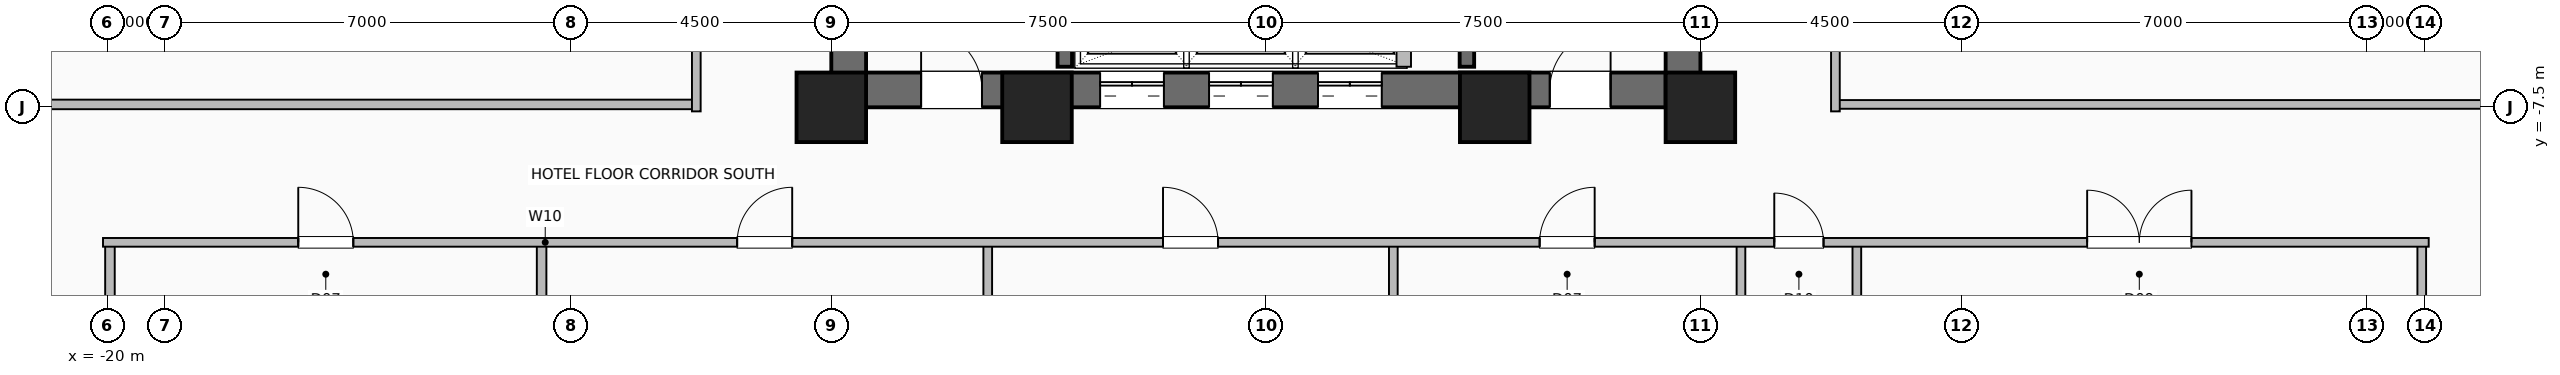
"""IFC4 building model, lengths in metres.
Left out: names, types, materials, properties, quantities, classifications, styles, units other than length and angle.
Written with IfcOpenShell. Run it as: python <this file> out.ifc"""

import sys

from ifc_helpers import new_model, si_unit, direction, frame, frame_2d, origin, origin_2d, place, context, subcontext, project, spatial, rectangle, hollow_rectangle, extrude, element, fill, save


model = new_model("IFC4")
c1 = context("Model", 3, precision=1e-05, world=origin(), true_north=direction((0.0, 1.0)))
c2 = subcontext(c1, "Body", "Model", "MODEL_VIEW")
j1 = project(units=[si_unit("LENGTHUNIT", "METRE"), si_unit("PLANEANGLEUNIT", "RADIAN")], contexts=[c1])
p1 = place(None, origin())
s1 = spatial("IfcSite", under=j1, at=p1, CompositionType="ELEMENT")
p2 = place(p1, origin())
s2 = spatial("IfcBuilding", under=s1, at=p2, CompositionType="ELEMENT")
p3 = place(p2, frame((0.0, 0.0, 41.0)))
s3 = spatial("IfcBuildingStorey", under=s2, at=p3, CompositionType="ELEMENT", Elevation=41.0)
for number, where, z_axis, x_axis in (
    (1, (-7.5, -7.5, 0.0), (0.0, 0.0, 1.0), (1.0, 0.0, 0.0)),
    (2, (-3.95, -7.5, 0.0), (0.0, 0.0, 1.0), (1.0, 0.0, 0.0)),
    (3, (3.95, -7.5, 0.0), (0.0, 0.0, 1.0), (1.0, 0.0, 0.0)),
    (4, (7.5, -7.5, 0.0), (0.0, 0.0, 1.0), (1.0, 0.0, 0.0)),
):
    element("IfcColumn", number, at=place(p3, frame(where, z_axis=z_axis, x_axis=x_axis)), inside=s3, PredefinedType="COLUMN", context=c2, shape_type="SweptSolid", body=[
        extrude(hollow_rectangle(XDim=1.2, YDim=1.2, WallThickness=0.055, at=origin_2d()), origin(), (0.0, 0.0, 1.0), 3.5),
    ])
p4 = place(p3, frame((-7.5, -7.2, 0.0), z_axis=(0.0, 0.0, 1.0), x_axis=(1.0, 0.0, 0.0)))
e5 = element("IfcWall", 5, at=p4, inside=s3, PredefinedType="SHEAR", context=c2, shape_type="SweptSolid", body=[
    extrude(rectangle(XDim=15.0, YDim=0.6, at=frame_2d((7.5, 0.0))), origin(), (0.0, 0.0, 1.0), 3.25),
])
p5 = place(p4, frame((1.55, 0.0, 0.0)))
e6 = element("IfcOpeningElement", 6, at=p5, cuts=e5, PredefinedType="OPENING", context=c2, shape_type="SweptSolid", body=[
    extrude(rectangle(XDim=1.05, YDim=2.08, at=frame_2d((0.525, 1.04))), frame((0.0, 0.31, 0.0), z_axis=(0.0, -1.0, 0.0), x_axis=(1.0, 0.0, 0.0)), (0.0, 0.0, 1.0), 0.62),
])
p6 = place(p4, frame((12.4, 0.0, 0.0)))
e7 = element("IfcOpeningElement", 7, at=p6, cuts=e5, PredefinedType="OPENING", context=c2, shape_type="SweptSolid", body=[
    extrude(rectangle(XDim=1.05, YDim=2.08, at=frame_2d((0.525, 1.04))), frame((0.0, 0.31, 0.0), z_axis=(0.0, -1.0, 0.0), x_axis=(1.0, 0.0, 0.0)), (0.0, 0.0, 1.0), 0.62),
])
p7 = place(p4, frame((4.64, 0.0, 0.0)))
e8 = element("IfcOpeningElement", 8, at=p7, cuts=e5, PredefinedType="OPENING", context=c2, shape_type="SweptSolid", body=[
    extrude(rectangle(XDim=1.1, YDim=2.2, at=frame_2d((0.55, 1.1))), frame((0.0, 0.31, 0.0), z_axis=(0.0, -1.0, 0.0), x_axis=(1.0, 0.0, 0.0)), (0.0, 0.0, 1.0), 0.62),
])
p8 = place(p4, frame((6.52, 0.0, 0.0)))
e9 = element("IfcOpeningElement", 9, at=p8, cuts=e5, PredefinedType="OPENING", context=c2, shape_type="SweptSolid", body=[
    extrude(rectangle(XDim=1.1, YDim=2.2, at=frame_2d((0.55, 1.1))), frame((0.0, 0.31, 0.0), z_axis=(0.0, -1.0, 0.0), x_axis=(1.0, 0.0, 0.0)), (0.0, 0.0, 1.0), 0.62),
])
p9 = place(p4, frame((8.4, 0.0, 0.0)))
e10 = element("IfcOpeningElement", 10, at=p9, cuts=e5, PredefinedType="OPENING", context=c2, shape_type="SweptSolid", body=[
    extrude(rectangle(XDim=1.1, YDim=2.2, at=frame_2d((0.55, 1.1))), frame((0.0, 0.31, 0.0), z_axis=(0.0, -1.0, 0.0), x_axis=(1.0, 0.0, 0.0)), (0.0, 0.0, 1.0), 0.62),
])
p10 = place(p3, frame((-7.2, -7.5, 0.0), z_axis=(0.0, 0.0, 1.0), x_axis=(0.0, 1.0, 0.0)))
e11 = element("IfcWall", 11, at=p10, inside=s3, PredefinedType="SHEAR", context=c2, shape_type="SweptSolid", body=[
    extrude(rectangle(XDim=15.0, YDim=0.6, at=frame_2d((7.5, 0.0))), origin(), (0.0, 0.0, 1.0), 3.25),
])
p11 = place(p10, frame((9.5, 0.0, 0.0)))
e12 = element("IfcOpeningElement", 12, at=p11, cuts=e11, PredefinedType="OPENING", context=c2, shape_type="SweptSolid", body=[
    extrude(rectangle(XDim=1.0, YDim=2.08, at=frame_2d((0.5, 1.04))), frame((0.0, 0.31, 0.0), z_axis=(0.0, -1.0, 0.0), x_axis=(1.0, 0.0, 0.0)), (0.0, 0.0, 1.0), 0.62),
])
p12 = place(p3, frame((7.2, -7.5, 0.0), z_axis=(0.0, 0.0, 1.0), x_axis=(0.0, 1.0, 0.0)))
e13 = element("IfcWall", 13, at=p12, inside=s3, PredefinedType="SHEAR", context=c2, shape_type="SweptSolid", body=[
    extrude(rectangle(XDim=15.0, YDim=0.6, at=frame_2d((7.5, 0.0))), origin(), (0.0, 0.0, 1.0), 3.25),
])
for number, where, z_axis, x_axis in (
    (14, (-3.47, -6.8, 0.0), (0.0, 0.0, 1.0), (0.0, 1.0, 0.0)),
    (15, (3.47, -6.8, 0.0), (0.0, 0.0, 1.0), (0.0, 1.0, 0.0)),
):
    element("IfcWall", number, at=place(p3, frame(where, z_axis=z_axis, x_axis=x_axis)), inside=s3, PredefinedType="SHEAR", context=c2, shape_type="SweptSolid", body=[
        extrude(rectangle(XDim=7.72, YDim=0.25, at=frame_2d((3.86, 0.0))), origin(), (0.0, 0.0, 1.0), 3.25),
    ])
p13 = place(p3, frame((2.38, -6.8, 0.0), z_axis=(0.0, 0.0, 1.0), x_axis=(0.0, 1.0, 0.0)))
e16 = element("IfcWall", 16, at=p13, inside=s3, PredefinedType="SHEAR", context=c2, shape_type="SweptSolid", body=[
    extrude(rectangle(XDim=2.22, YDim=0.25, at=frame_2d((1.11, 0.0))), origin(), (0.0, 0.0, 1.0), 3.25),
])
for number, where, z_axis, x_axis in (
    (17, (-19.95, -23.82, 0.0), (0.0, 0.0, 1.0), (0.0, 1.0, 0.0)),
    (18, (-12.5, -23.82, 0.0), (0.0, 0.0, 1.0), (0.0, 1.0, 0.0)),
):
    element("IfcWall", number, at=place(p3, frame(where, z_axis=z_axis, x_axis=x_axis)), inside=s3, PredefinedType="PLUMBINGWALL", context=c2, shape_type="SweptSolid", body=[
        extrude(rectangle(XDim=13.99, YDim=0.165, at=frame_2d((6.995, 0.0))), origin(), (0.0, 0.0, 1.0), 3.25),
    ])
p14 = place(p3, frame((-4.8, -23.82, 0.0), z_axis=(0.0, 0.0, 1.0), x_axis=(0.0, 1.0, 0.0)))
e19 = element("IfcWall", 19, at=p14, inside=s3, PredefinedType="PARTITIONING", context=c2, shape_type="SweptSolid", body=[
    extrude(rectangle(XDim=13.99, YDim=0.15, at=frame_2d((6.995, 0.0))), origin(), (0.0, 0.0, 1.0), 2.818),
])
for number, where, z_axis, x_axis in (
    (20, (2.2, -23.82, 0.0), (0.0, 0.0, 1.0), (0.0, 1.0, 0.0)),
    (21, (8.2, -23.82, 0.0), (0.0, 0.0, 1.0), (0.0, 1.0, 0.0)),
    (22, (10.2, -23.82, 0.0), (0.0, 0.0, 1.0), (0.0, 1.0, 0.0)),
    (23, (19.95, -23.82, 0.0), (0.0, 0.0, 1.0), (0.0, 1.0, 0.0)),
):
    element("IfcWall", number, at=place(p3, frame(where, z_axis=z_axis, x_axis=x_axis)), inside=s3, PredefinedType="PARTITIONING", context=c2, shape_type="SweptSolid", body=[
        extrude(rectangle(XDim=13.99, YDim=0.15, at=frame_2d((6.995, 0.0))), origin(), (0.0, 0.0, 1.0), 3.25),
    ])
p15 = place(p3, frame((-20.07, -9.83, 0.0), z_axis=(0.0, 0.0, 1.0), x_axis=(1.0, 0.0, 0.0)))
e24 = element("IfcWall", 24, at=p15, inside=s3, PredefinedType="PARTITIONING", context=c2, shape_type="SweptSolid", body=[
    extrude(rectangle(XDim=40.14, YDim=0.15, at=frame_2d((20.07, 0.0))), origin(), (0.0, 0.0, 1.0), 3.25),
])
p16 = place(p15, frame((3.37, 0.0, 0.0)))
e25 = element("IfcOpeningElement", 25, at=p16, cuts=e24, PredefinedType="OPENING", context=c2, shape_type="SweptSolid", body=[
    extrude(rectangle(XDim=0.95, YDim=2.06, at=frame_2d((0.475, 1.03))), frame((0.0, 0.085, 0.0), z_axis=(0.0, -1.0, 0.0), x_axis=(1.0, 0.0, 0.0)), (0.0, 0.0, 1.0), 0.17),
])
p17 = place(p15, frame((10.945, 0.0, 0.0)))
e26 = element("IfcOpeningElement", 26, at=p17, cuts=e24, PredefinedType="OPENING", context=c2, shape_type="SweptSolid", body=[
    extrude(rectangle(XDim=0.95, YDim=2.06, at=frame_2d((0.475, 1.03))), frame((0.0, 0.085, 0.0), z_axis=(0.0, -1.0, 0.0), x_axis=(1.0, 0.0, 0.0)), (0.0, 0.0, 1.0), 0.17),
])
p18 = place(p15, frame((18.295, 0.0, 0.0)))
e27 = element("IfcOpeningElement", 27, at=p18, cuts=e24, PredefinedType="OPENING", context=c2, shape_type="SweptSolid", body=[
    extrude(rectangle(XDim=0.95, YDim=2.06, at=frame_2d((0.475, 1.03))), frame((0.0, 0.085, 0.0), z_axis=(0.0, -1.0, 0.0), x_axis=(1.0, 0.0, 0.0)), (0.0, 0.0, 1.0), 0.17),
])
p19 = place(p15, frame((24.795, 0.0, 0.0)))
e28 = element("IfcOpeningElement", 28, at=p19, cuts=e24, PredefinedType="OPENING", context=c2, shape_type="SweptSolid", body=[
    extrude(rectangle(XDim=0.95, YDim=2.06, at=frame_2d((0.475, 1.03))), frame((0.0, 0.085, 0.0), z_axis=(0.0, -1.0, 0.0), x_axis=(1.0, 0.0, 0.0)), (0.0, 0.0, 1.0), 0.17),
])
p20 = place(p15, frame((28.845, 0.0, 0.0)))
e29 = element("IfcOpeningElement", 29, at=p20, cuts=e24, PredefinedType="OPENING", context=c2, shape_type="SweptSolid", body=[
    extrude(rectangle(XDim=0.85, YDim=2.05, at=frame_2d((0.425, 1.025))), frame((0.0, 0.085, 0.0), z_axis=(0.0, -1.0, 0.0), x_axis=(1.0, 0.0, 0.0)), (0.0, 0.0, 1.0), 0.17),
])
p21 = place(p15, frame((34.245, 0.0, 0.0)))
e30 = element("IfcOpeningElement", 30, at=p21, cuts=e24, PredefinedType="OPENING", context=c2, shape_type="SweptSolid", body=[
    extrude(rectangle(XDim=1.8, YDim=2.08, at=frame_2d((0.9, 1.04))), frame((0.0, 0.085, 0.0), z_axis=(0.0, -1.0, 0.0), x_axis=(1.0, 0.0, 0.0)), (0.0, 0.0, 1.0), 0.17),
])
p22 = place(p3, frame((-23.82, -7.45, 0.0), z_axis=(0.0, 0.0, 1.0), x_axis=(1.0, 0.0, 0.0)))
e31 = element("IfcWall", 31, at=p22, inside=s3, PredefinedType="PLUMBINGWALL", context=c2, shape_type="SweptSolid", body=[
    extrude(rectangle(XDim=13.99, YDim=0.165, at=frame_2d((6.995, 0.0))), origin(), (0.0, 0.0, 1.0), 3.25),
])
p23 = place(p3, frame((-9.83, -7.57, 0.0), z_axis=(0.0, 0.0, 1.0), x_axis=(0.0, 1.0, 0.0)))
e32 = element("IfcWall", 32, at=p23, inside=s3, PredefinedType="PARTITIONING", context=c2, shape_type="SweptSolid", body=[
    extrude(rectangle(XDim=15.14, YDim=0.15, at=frame_2d((7.57, 0.0))), origin(), (0.0, 0.0, 1.0), 3.25),
])
p24 = place(p23, frame((4.845, 0.0, 0.0)))
e33 = element("IfcOpeningElement", 33, at=p24, cuts=e32, PredefinedType="OPENING", context=c2, shape_type="SweptSolid", body=[
    extrude(rectangle(XDim=1.8, YDim=2.08, at=frame_2d((0.9, 1.04))), frame((0.0, 0.085, 0.0), z_axis=(0.0, -1.0, 0.0), x_axis=(1.0, 0.0, 0.0)), (0.0, 0.0, 1.0), 0.17),
])
p25 = place(p23, frame((11.77, 0.0, 0.0)))
e34 = element("IfcOpeningElement", 34, at=p25, cuts=e32, PredefinedType="OPENING", context=c2, shape_type="SweptSolid", body=[
    extrude(rectangle(XDim=0.85, YDim=2.05, at=frame_2d((0.425, 1.025))), frame((0.0, 0.085, 0.0), z_axis=(0.0, -1.0, 0.0), x_axis=(1.0, 0.0, 0.0)), (0.0, 0.0, 1.0), 0.17),
])
p26 = place(p23, frame((13.545, 0.0, 0.0)))
e35 = element("IfcOpeningElement", 35, at=p26, cuts=e32, PredefinedType="OPENING", context=c2, shape_type="SweptSolid", body=[
    extrude(rectangle(XDim=0.95, YDim=2.06, at=frame_2d((0.475, 1.03))), frame((0.0, 0.085, 0.0), z_axis=(0.0, -1.0, 0.0), x_axis=(1.0, 0.0, 0.0)), (0.0, 0.0, 1.0), 0.17),
])
p27 = place(p3, frame((9.83, -7.45, 0.0), z_axis=(0.0, 0.0, 1.0), x_axis=(1.0, 0.0, 0.0)))
e36 = element("IfcWall", 36, at=p27, inside=s3, PredefinedType="PARTITIONING", context=c2, shape_type="SweptSolid", body=[
    extrude(rectangle(XDim=13.99, YDim=0.15, at=frame_2d((6.995, 0.0))), origin(), (0.0, 0.0, 1.0), 3.25),
])
p28 = place(p3, frame((9.83, -7.57, 0.0), z_axis=(0.0, 0.0, 1.0), x_axis=(0.0, 1.0, 0.0)))
e37 = element("IfcWall", 37, at=p28, inside=s3, PredefinedType="PARTITIONING", context=c2, shape_type="SweptSolid", body=[
    extrude(rectangle(XDim=15.14, YDim=0.15, at=frame_2d((7.57, 0.0))), origin(), (0.0, 0.0, 1.0), 3.25),
])
p29 = place(p28, frame((2.12, 0.0, 0.0)))
e38 = element("IfcOpeningElement", 38, at=p29, cuts=e37, PredefinedType="OPENING", context=c2, shape_type="SweptSolid", body=[
    extrude(rectangle(XDim=0.95, YDim=2.06, at=frame_2d((0.475, 1.03))), frame((0.0, 0.085, 0.0), z_axis=(0.0, -1.0, 0.0), x_axis=(1.0, 0.0, 0.0)), (0.0, 0.0, 1.0), 0.17),
])
p30 = place(p28, frame((7.095, 0.0, 0.0)))
e39 = element("IfcOpeningElement", 39, at=p30, cuts=e37, PredefinedType="OPENING", context=c2, shape_type="SweptSolid", body=[
    extrude(rectangle(XDim=0.95, YDim=2.06, at=frame_2d((0.475, 1.03))), frame((0.0, 0.085, 0.0), z_axis=(0.0, -1.0, 0.0), x_axis=(1.0, 0.0, 0.0)), (0.0, 0.0, 1.0), 0.17),
])
p31 = place(p28, frame((12.07, 0.0, 0.0)))
e40 = element("IfcOpeningElement", 40, at=p31, cuts=e37, PredefinedType="OPENING", context=c2, shape_type="SweptSolid", body=[
    extrude(rectangle(XDim=0.95, YDim=2.06, at=frame_2d((0.475, 1.03))), frame((0.0, 0.085, 0.0), z_axis=(0.0, -1.0, 0.0), x_axis=(1.0, 0.0, 0.0)), (0.0, 0.0, 1.0), 0.17),
])
p32 = place(p5, origin())
e41 = element("IfcDoor", 41, at=p32, inside=s3, OperationType="SINGLE_SWING_LEFT", PredefinedType="DOOR", context=c2, shape_type="SweptSolid", body=[
    extrude(rectangle(XDim=1.05, YDim=2.08, at=frame_2d((0.525, 1.04))), frame((0.0, 0.025, 0.0), z_axis=(0.0, -1.0, 0.0), x_axis=(1.0, 0.0, 0.0)), (0.0, 0.0, 1.0), 0.05),
])
fill(e6, e41)
p33 = place(p6, origin())
e42 = element("IfcDoor", 42, at=p33, inside=s3, OperationType="SINGLE_SWING_RIGHT", PredefinedType="DOOR", context=c2, shape_type="SweptSolid", body=[
    extrude(rectangle(XDim=1.05, YDim=2.08, at=frame_2d((0.525, 1.04))), frame((0.0, 0.025, 0.0), z_axis=(0.0, -1.0, 0.0), x_axis=(1.0, 0.0, 0.0)), (0.0, 0.0, 1.0), 0.05),
])
fill(e7, e42)
p34 = place(p7, origin())
e43 = element("IfcDoor", 43, at=p34, inside=s3, OperationType="DOUBLE_DOOR_SLIDING", PredefinedType="DOOR", context=c2, shape_type="SweptSolid", body=[
    extrude(rectangle(XDim=1.1, YDim=2.2, at=frame_2d((0.55, 1.1))), frame((0.0, 0.025, 0.0), z_axis=(0.0, -1.0, 0.0), x_axis=(1.0, 0.0, 0.0)), (0.0, 0.0, 1.0), 0.05),
])
fill(e8, e43)
p35 = place(p8, origin())
e44 = element("IfcDoor", 44, at=p35, inside=s3, OperationType="DOUBLE_DOOR_SLIDING", PredefinedType="DOOR", context=c2, shape_type="SweptSolid", body=[
    extrude(rectangle(XDim=1.1, YDim=2.2, at=frame_2d((0.55, 1.1))), frame((0.0, 0.025, 0.0), z_axis=(0.0, -1.0, 0.0), x_axis=(1.0, 0.0, 0.0)), (0.0, 0.0, 1.0), 0.05),
])
fill(e9, e44)
p36 = place(p9, origin())
e45 = element("IfcDoor", 45, at=p36, inside=s3, OperationType="DOUBLE_DOOR_SLIDING", PredefinedType="DOOR", context=c2, shape_type="SweptSolid", body=[
    extrude(rectangle(XDim=1.1, YDim=2.2, at=frame_2d((0.55, 1.1))), frame((0.0, 0.025, 0.0), z_axis=(0.0, -1.0, 0.0), x_axis=(1.0, 0.0, 0.0)), (0.0, 0.0, 1.0), 0.05),
])
fill(e10, e45)
p37 = place(p16, origin())
e46 = element("IfcDoor", 46, at=p37, inside=s3, OperationType="SINGLE_SWING_LEFT", PredefinedType="DOOR", context=c2, shape_type="SweptSolid", body=[
    extrude(rectangle(XDim=0.95, YDim=2.06, at=frame_2d((0.475, 1.03))), frame((0.0, 0.025, 0.0), z_axis=(0.0, -1.0, 0.0), x_axis=(1.0, 0.0, 0.0)), (0.0, 0.0, 1.0), 0.05),
])
fill(e25, e46)
p38 = place(p17, origin())
e47 = element("IfcDoor", 47, at=p38, inside=s3, OperationType="SINGLE_SWING_RIGHT", PredefinedType="DOOR", context=c2, shape_type="SweptSolid", body=[
    extrude(rectangle(XDim=0.95, YDim=2.06, at=frame_2d((0.475, 1.03))), frame((0.0, 0.025, 0.0), z_axis=(0.0, -1.0, 0.0), x_axis=(1.0, 0.0, 0.0)), (0.0, 0.0, 1.0), 0.05),
])
fill(e26, e47)
p39 = place(p18, origin())
e48 = element("IfcDoor", 48, at=p39, inside=s3, OperationType="SINGLE_SWING_LEFT", PredefinedType="DOOR", context=c2, shape_type="SweptSolid", body=[
    extrude(rectangle(XDim=0.95, YDim=2.06, at=frame_2d((0.475, 1.03))), frame((0.0, 0.025, 0.0), z_axis=(0.0, -1.0, 0.0), x_axis=(1.0, 0.0, 0.0)), (0.0, 0.0, 1.0), 0.05),
])
fill(e27, e48)
p40 = place(p19, origin())
e49 = element("IfcDoor", 49, at=p40, inside=s3, OperationType="SINGLE_SWING_RIGHT", PredefinedType="DOOR", context=c2, shape_type="SweptSolid", body=[
    extrude(rectangle(XDim=0.95, YDim=2.06, at=frame_2d((0.475, 1.03))), frame((0.0, 0.025, 0.0), z_axis=(0.0, -1.0, 0.0), x_axis=(1.0, 0.0, 0.0)), (0.0, 0.0, 1.0), 0.05),
])
fill(e28, e49)
p41 = place(p20, origin())
e50 = element("IfcDoor", 50, at=p41, inside=s3, OperationType="SINGLE_SWING_LEFT", PredefinedType="DOOR", context=c2, shape_type="SweptSolid", body=[
    extrude(rectangle(XDim=0.85, YDim=2.05, at=frame_2d((0.425, 1.025))), frame((0.0, 0.025, 0.0), z_axis=(0.0, -1.0, 0.0), x_axis=(1.0, 0.0, 0.0)), (0.0, 0.0, 1.0), 0.05),
])
fill(e29, e50)
p42 = place(p21, origin())
e51 = element("IfcDoor", 51, at=p42, inside=s3, OperationType="DOUBLE_DOOR_SINGLE_SWING", PredefinedType="DOOR", context=c2, shape_type="SweptSolid", body=[
    extrude(rectangle(XDim=1.8, YDim=2.08, at=frame_2d((0.9, 1.04))), frame((0.0, 0.025, 0.0), z_axis=(0.0, -1.0, 0.0), x_axis=(1.0, 0.0, 0.0)), (0.0, 0.0, 1.0), 0.05),
])
fill(e30, e51)
save(model, sys.argv[1])
